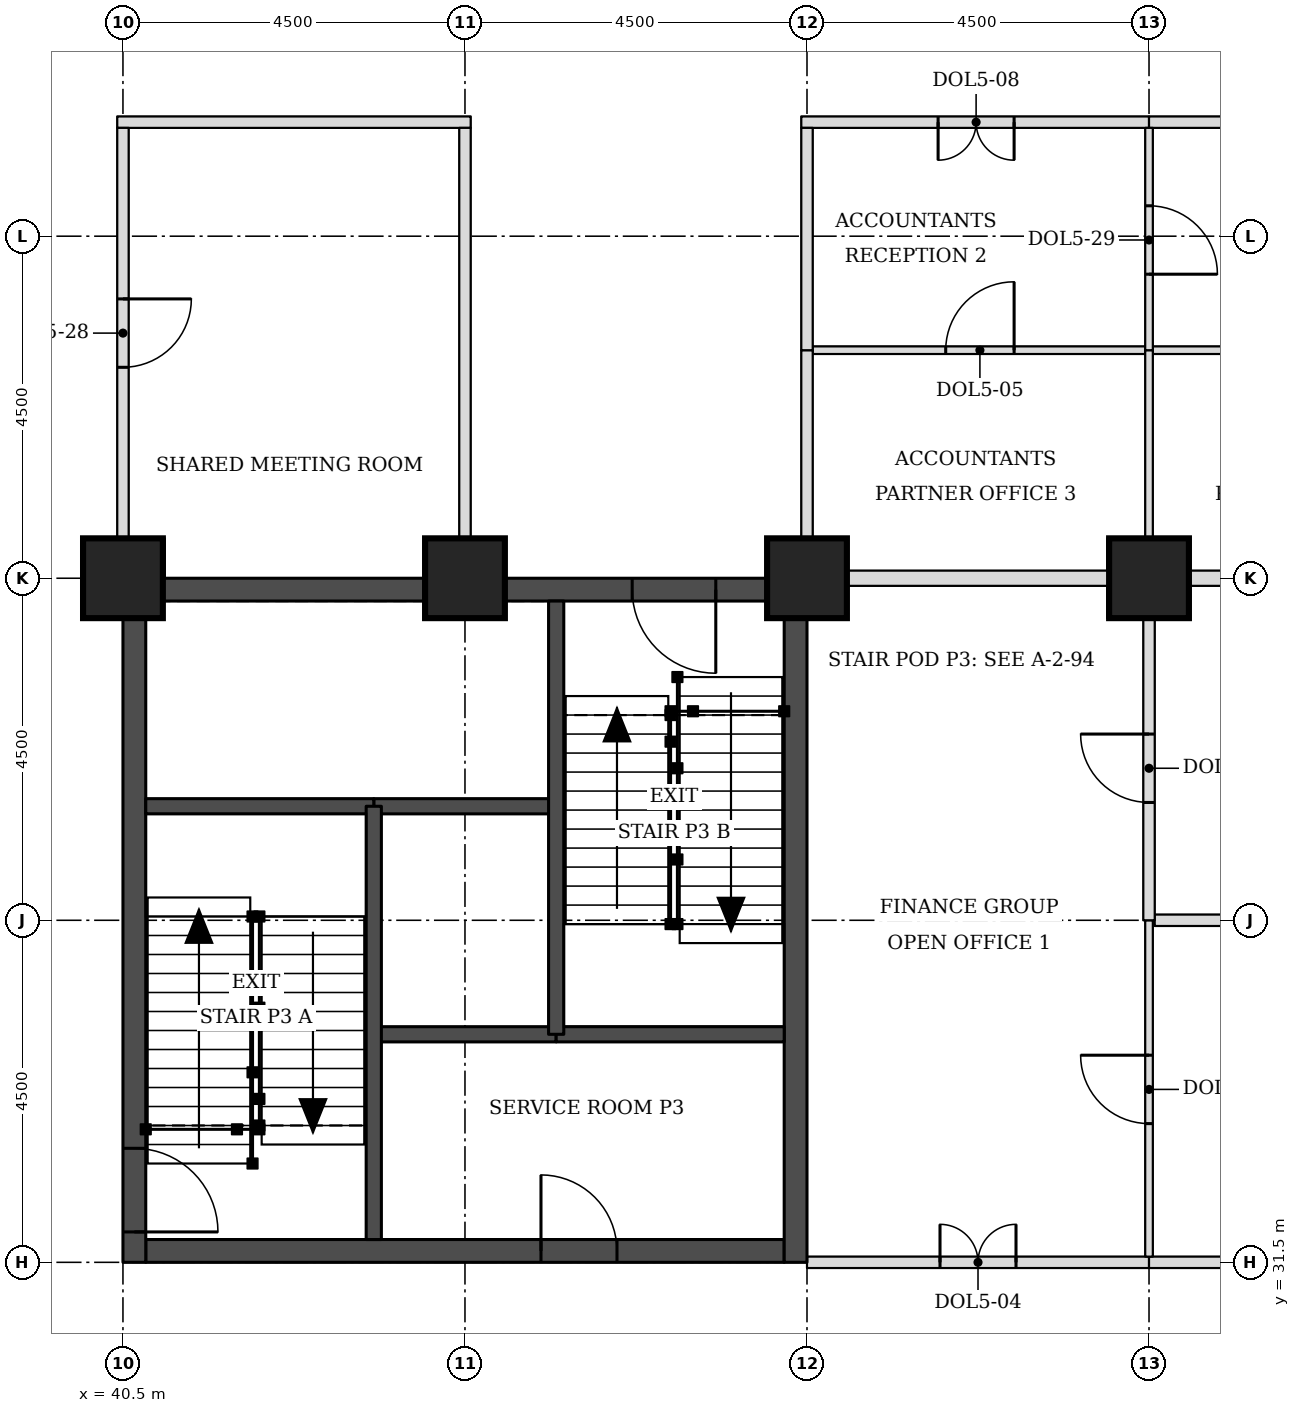
"""IFC4 building model, lengths in metres.
Left out: names, types, materials, properties, quantities, classifications, styles, units other than length and angle.
Written with IfcOpenShell. Run it as: python <this file> out.ifc"""

import sys

from ifc_helpers import new_model, si_unit, direction, frame, frame_2d, origin, origin_2d, place, context, subcontext, project, spatial, rectangle, extrude, element, fill, save


model = new_model("IFC4")
c1 = context("Model", 3, precision=1e-05, world=origin(), true_north=direction((0.0, 1.0)))
c2 = subcontext(c1, "Body", "Model", "MODEL_VIEW")
j1 = project(units=[si_unit("LENGTHUNIT", "METRE"), si_unit("PLANEANGLEUNIT", "RADIAN")], contexts=[c1])
p1 = place(None, origin())
s1 = spatial("IfcSite", under=j1, at=p1, CompositionType="ELEMENT")
p2 = place(p1, origin())
s2 = spatial("IfcBuilding", under=s1, at=p2, CompositionType="ELEMENT")
p3 = place(p2, frame((0.0, 0.0, 108.5)))
s3 = spatial("IfcBuildingStorey", under=s2, at=p3, CompositionType="ELEMENT", Elevation=108.5)
for number, where, z_axis, x_axis in (
    (1, (40.5, 40.5, 0.0), (0.0, 0.0, 1.0), (1.0, 0.0, 0.0)),
    (2, (45.0, 40.5, 0.0), (0.0, 0.0, 1.0), (1.0, 0.0, 0.0)),
    (3, (49.5, 40.5, 0.0), (0.0, 0.0, 1.0), (1.0, 0.0, 0.0)),
    (4, (54.0, 40.5, 0.0), (0.0, 0.0, 1.0), (1.0, 0.0, 0.0)),
):
    element("IfcColumn", number, at=place(p3, frame(where, z_axis=z_axis, x_axis=x_axis)), inside=s3, PredefinedType="COLUMN", context=c2, shape_type="SweptSolid", body=[
        extrude(rectangle(XDim=1.05, YDim=1.05, at=origin_2d()), origin(), (0.0, 0.0, 1.0), 3.7),
    ])
p4 = place(p3, frame((40.8, 31.65, 0.0), z_axis=(0.0, 0.0, 1.0), x_axis=(1.0, 0.0, 0.0)))
e5 = element("IfcWall", 5, at=p4, inside=s3, PredefinedType="SHEAR", context=c2, shape_type="SweptSolid", body=[
    extrude(rectangle(XDim=8.4, YDim=0.3, at=frame_2d((4.2, 0.0))), origin(), (0.0, 0.0, 1.0), 3.7),
])
p5 = place(p4, frame((5.2, 0.0, 0.0)))
e6 = element("IfcOpeningElement", 6, at=p5, cuts=e5, PredefinedType="OPENING", context=c2, shape_type="SweptSolid", body=[
    extrude(rectangle(XDim=1.0, YDim=2.1, at=frame_2d((0.5, 1.05))), frame((0.0, 0.16, 0.0), z_axis=(0.0, -1.0, 0.0), x_axis=(1.0, 0.0, 0.0)), (0.0, 0.0, 1.0), 0.32),
])
p6 = place(p3, frame((40.8, 40.35, 0.0), z_axis=(0.0, 0.0, 1.0), x_axis=(1.0, 0.0, 0.0)))
e7 = element("IfcWall", 7, at=p6, inside=s3, PredefinedType="SHEAR", context=c2, shape_type="SweptSolid", body=[
    extrude(rectangle(XDim=8.4, YDim=0.3, at=frame_2d((4.2, 0.0))), origin(), (0.0, 0.0, 1.0), 3.7),
])
p7 = place(p6, frame((6.4, 0.0, 0.0)))
e8 = element("IfcOpeningElement", 8, at=p7, cuts=e7, PredefinedType="OPENING", context=c2, shape_type="SweptSolid", body=[
    extrude(rectangle(XDim=1.1, YDim=2.1, at=frame_2d((0.55, 1.05))), frame((0.0, 0.16, 0.0), z_axis=(0.0, -1.0, 0.0), x_axis=(1.0, 0.0, 0.0)), (0.0, 0.0, 1.0), 0.32),
])
p8 = place(p3, frame((40.65, 31.5, 0.0), z_axis=(0.0, 0.0, 1.0), x_axis=(0.0, 1.0, 0.0)))
e9 = element("IfcWall", 9, at=p8, inside=s3, PredefinedType="SHEAR", context=c2, shape_type="SweptSolid", body=[
    extrude(rectangle(XDim=9.0, YDim=0.3, at=frame_2d((4.5, 0.0))), origin(), (0.0, 0.0, 1.0), 3.7),
])
p9 = place(p8, frame((0.4, 0.0, 0.0)))
e10 = element("IfcOpeningElement", 10, at=p9, cuts=e9, PredefinedType="OPENING", context=c2, shape_type="SweptSolid", body=[
    extrude(rectangle(XDim=1.1, YDim=2.1, at=frame_2d((0.55, 1.05))), frame((0.0, 0.16, 0.0), z_axis=(0.0, -1.0, 0.0), x_axis=(1.0, 0.0, 0.0)), (0.0, 0.0, 1.0), 0.32),
])
p10 = place(p3, frame((49.35, 31.5, 0.0), z_axis=(0.0, 0.0, 1.0), x_axis=(0.0, 1.0, 0.0)))
e11 = element("IfcWall", 11, at=p10, inside=s3, PredefinedType="SHEAR", context=c2, shape_type="SweptSolid", body=[
    extrude(rectangle(XDim=9.0, YDim=0.3, at=frame_2d((4.5, 0.0))), origin(), (0.0, 0.0, 1.0), 3.7),
])
p11 = place(p3, frame((49.5, 31.5, 0.0), z_axis=(0.0, 0.0, 1.0), x_axis=(1.0, 0.0, 0.0)))
e12 = element("IfcWall", 12, at=p11, inside=s3, PredefinedType="PARTITIONING", context=c2, shape_type="SweptSolid", body=[
    extrude(rectangle(XDim=4.5, YDim=0.15, at=frame_2d((2.25, 0.0))), origin(), (0.0, 0.0, 1.0), 2.55),
])
p12 = place(p11, frame((1.75, 0.0, 0.0)))
e13 = element("IfcOpeningElement", 13, at=p12, cuts=e12, PredefinedType="OPENING", context=c2, shape_type="SweptSolid", body=[
    extrude(rectangle(XDim=1.0, YDim=2.1, at=frame_2d((0.5, 1.05))), frame((0.0, 0.085, 0.0), z_axis=(0.0, -1.0, 0.0), x_axis=(1.0, 0.0, 0.0)), (0.0, 0.0, 1.0), 0.17),
])
p13 = place(p3, frame((54.0, 31.5, 0.0), z_axis=(0.0, 0.0, 1.0), x_axis=(1.0, 0.0, 0.0)))
e14 = element("IfcWall", 14, at=p13, inside=s3, PredefinedType="PARTITIONING", context=c2, shape_type="SweptSolid", body=[
    extrude(rectangle(XDim=5.025, YDim=0.15, at=frame_2d((2.512, 0.0))), origin(), (0.0, 0.0, 1.0), 2.55),
])
p14 = place(p3, frame((54.075, 36.0, 0.0), z_axis=(0.0, 0.0, 1.0), x_axis=(1.0, 0.0, 0.0)))
e15 = element("IfcWall", 15, at=p14, inside=s3, PredefinedType="PARTITIONING", context=c2, shape_type="SweptSolid", body=[
    extrude(rectangle(XDim=4.95, YDim=0.15, at=frame_2d((2.475, 0.0))), origin(), (0.0, 0.0, 1.0), 3.096),
])
p15 = place(p3, frame((50.015, 40.5, 0.0), z_axis=(0.0, 0.0, 1.0), x_axis=(1.0, 0.0, 0.0)))
e16 = element("IfcWall", 16, at=p15, inside=s3, PredefinedType="PARTITIONING", context=c2, shape_type="SweptSolid", body=[
    extrude(rectangle(XDim=3.46, YDim=0.2, at=frame_2d((1.73, 0.0))), origin(), (0.0, 0.0, 1.0), 2.8),
])
p16 = place(p3, frame((54.495, 40.5, 0.0), z_axis=(0.0, 0.0, 1.0), x_axis=(1.0, 0.0, 0.0)))
e17 = element("IfcWall", 17, at=p16, inside=s3, PredefinedType="PARTITIONING", context=c2, shape_type="SweptSolid", body=[
    extrude(rectangle(XDim=3.48, YDim=0.2, at=frame_2d((1.74, 0.0))), origin(), (0.0, 0.0, 1.0), 2.8),
])
p17 = place(p3, frame((49.575, 43.5, 0.0), z_axis=(0.0, 0.0, 1.0), x_axis=(1.0, 0.0, 0.0)))
e18 = element("IfcWall", 18, at=p17, inside=s3, PredefinedType="PARTITIONING", context=c2, shape_type="SweptSolid", body=[
    extrude(rectangle(XDim=4.375, YDim=0.1, at=frame_2d((2.188, 0.0))), origin(), (0.0, 0.0, 1.0), 3.55),
])
p18 = place(p17, frame((1.75, 0.0, 0.0)))
e19 = element("IfcOpeningElement", 19, at=p18, cuts=e18, PredefinedType="OPENING", context=c2, shape_type="SweptSolid", body=[
    extrude(rectangle(XDim=0.9, YDim=2.1, at=frame_2d((0.45, 1.05))), frame((0.0, 0.06, 0.0), z_axis=(0.0, -1.0, 0.0), x_axis=(1.0, 0.0, 0.0)), (0.0, 0.0, 1.0), 0.12),
])
p19 = place(p3, frame((54.05, 43.5, 0.0), z_axis=(0.0, 0.0, 1.0), x_axis=(1.0, 0.0, 0.0)))
e20 = element("IfcWall", 20, at=p19, inside=s3, PredefinedType="PARTITIONING", context=c2, shape_type="SweptSolid", body=[
    extrude(rectangle(XDim=4.45, YDim=0.1, at=frame_2d((2.225, 0.0))), origin(), (0.0, 0.0, 1.0), 3.55),
])
p20 = place(p19, frame((1.8, 0.0, 0.0)))
e21 = element("IfcOpeningElement", 21, at=p20, cuts=e20, PredefinedType="OPENING", context=c2, shape_type="SweptSolid", body=[
    extrude(rectangle(XDim=0.9, YDim=2.1, at=frame_2d((0.45, 1.05))), frame((0.0, 0.06, 0.0), z_axis=(0.0, -1.0, 0.0), x_axis=(1.0, 0.0, 0.0)), (0.0, 0.0, 1.0), 0.12),
])
p21 = place(p3, frame((40.425, 46.5, 0.0), z_axis=(0.0, 0.0, 1.0), x_axis=(1.0, 0.0, 0.0)))
e22 = element("IfcWall", 22, at=p21, inside=s3, PredefinedType="PARTITIONING", context=c2, shape_type="SweptSolid", body=[
    extrude(rectangle(XDim=4.65, YDim=0.15, at=frame_2d((2.325, 0.0))), origin(), (0.0, 0.0, 1.0), 3.55),
])
p22 = place(p3, frame((49.425, 46.5, 0.0), z_axis=(0.0, 0.0, 1.0), x_axis=(1.0, 0.0, 0.0)))
e23 = element("IfcWall", 23, at=p22, inside=s3, PredefinedType="PARTITIONING", context=c2, shape_type="SweptSolid", body=[
    extrude(rectangle(XDim=4.575, YDim=0.15, at=frame_2d((2.288, 0.0))), origin(), (0.0, 0.0, 1.0), 3.55),
])
p23 = place(p22, frame((1.8, 0.0, 0.0)))
e24 = element("IfcOpeningElement", 24, at=p23, cuts=e23, PredefinedType="OPENING", context=c2, shape_type="SweptSolid", body=[
    extrude(rectangle(XDim=1.0, YDim=2.1, at=frame_2d((0.5, 1.05))), frame((0.0, 0.085, 0.0), z_axis=(0.0, -1.0, 0.0), x_axis=(1.0, 0.0, 0.0)), (0.0, 0.0, 1.0), 0.17),
])
p24 = place(p3, frame((54.0, 46.5, 0.0), z_axis=(0.0, 0.0, 1.0), x_axis=(1.0, 0.0, 0.0)))
e25 = element("IfcWall", 25, at=p24, inside=s3, PredefinedType="PARTITIONING", context=c2, shape_type="SweptSolid", body=[
    extrude(rectangle(XDim=16.5, YDim=0.15, at=frame_2d((8.25, 0.0))), origin(), (0.0, 0.0, 1.0), 3.55),
])
p25 = place(p3, frame((54.0, 31.575, 0.0), z_axis=(0.0, 0.0, 1.0), x_axis=(0.0, 1.0, 0.0)))
e26 = element("IfcWall", 26, at=p25, inside=s3, PredefinedType="PARTITIONING", context=c2, shape_type="SweptSolid", body=[
    extrude(rectangle(XDim=4.425, YDim=0.1, at=frame_2d((2.212, 0.0))), origin(), (0.0, 0.0, 1.0), 3.55),
])
p26 = place(p25, frame((1.75, 0.0, 0.0)))
e27 = element("IfcOpeningElement", 27, at=p26, cuts=e26, PredefinedType="OPENING", context=c2, shape_type="SweptSolid", body=[
    extrude(rectangle(XDim=0.9, YDim=2.1, at=frame_2d((0.45, 1.05))), frame((0.0, 0.06, 0.0), z_axis=(0.0, -1.0, 0.0), x_axis=(1.0, 0.0, 0.0)), (0.0, 0.0, 1.0), 0.12),
])
p27 = place(p3, frame((54.0, 36.0, 0.0), z_axis=(0.0, 0.0, 1.0), x_axis=(0.0, 1.0, 0.0)))
e28 = element("IfcWall", 28, at=p27, inside=s3, PredefinedType="PARTITIONING", context=c2, shape_type="SweptSolid", body=[
    extrude(rectangle(XDim=3.975, YDim=0.15, at=frame_2d((1.988, 0.0))), origin(), (0.0, 0.0, 1.0), 3.55),
])
p28 = place(p27, frame((1.55, 0.0, 0.0)))
e29 = element("IfcOpeningElement", 29, at=p28, cuts=e28, PredefinedType="OPENING", context=c2, shape_type="SweptSolid", body=[
    extrude(rectangle(XDim=0.9, YDim=2.1, at=frame_2d((0.45, 1.05))), frame((0.0, 0.085, 0.0), z_axis=(0.0, -1.0, 0.0), x_axis=(1.0, 0.0, 0.0)), (0.0, 0.0, 1.0), 0.17),
])
p29 = place(p3, frame((40.5, 41.025, 0.0), z_axis=(0.0, 0.0, 1.0), x_axis=(0.0, 1.0, 0.0)))
e30 = element("IfcWall", 30, at=p29, inside=s3, PredefinedType="PARTITIONING", context=c2, shape_type="SweptSolid", body=[
    extrude(rectangle(XDim=5.4, YDim=0.15, at=frame_2d((2.7, 0.0))), origin(), (0.0, 0.0, 1.0), 3.55),
])
p30 = place(p29, frame((2.25, 0.0, 0.0)))
e31 = element("IfcOpeningElement", 31, at=p30, cuts=e30, PredefinedType="OPENING", context=c2, shape_type="SweptSolid", body=[
    extrude(rectangle(XDim=0.9, YDim=2.1, at=frame_2d((0.45, 1.05))), frame((0.0, 0.085, 0.0), z_axis=(0.0, -1.0, 0.0), x_axis=(1.0, 0.0, 0.0)), (0.0, 0.0, 1.0), 0.17),
])
p31 = place(p3, frame((45.0, 41.025, 0.0), z_axis=(0.0, 0.0, 1.0), x_axis=(0.0, 1.0, 0.0)))
e32 = element("IfcWall", 32, at=p31, inside=s3, PredefinedType="PARTITIONING", context=c2, shape_type="SweptSolid", body=[
    extrude(rectangle(XDim=5.4, YDim=0.15, at=frame_2d((2.7, 0.0))), origin(), (0.0, 0.0, 1.0), 3.55),
])
p32 = place(p3, frame((49.5, 41.025, 0.0), z_axis=(0.0, 0.0, 1.0), x_axis=(0.0, 1.0, 0.0)))
e33 = element("IfcWall", 33, at=p32, inside=s3, PredefinedType="PARTITIONING", context=c2, shape_type="SweptSolid", body=[
    extrude(rectangle(XDim=2.475, YDim=0.15, at=frame_2d((1.238, 0.0))), origin(), (0.0, 0.0, 1.0), 3.55),
])
p33 = place(p3, frame((54.0, 41.025, 0.0), z_axis=(0.0, 0.0, 1.0), x_axis=(0.0, 1.0, 0.0)))
e34 = element("IfcWall", 34, at=p33, inside=s3, PredefinedType="PARTITIONING", context=c2, shape_type="SweptSolid", body=[
    extrude(rectangle(XDim=2.475, YDim=0.1, at=frame_2d((1.238, 0.0))), origin(), (0.0, 0.0, 1.0), 3.55),
])
p34 = place(p3, frame((49.5, 43.5, 0.0), z_axis=(0.0, 0.0, 1.0), x_axis=(0.0, 1.0, 0.0)))
e35 = element("IfcWall", 35, at=p34, inside=s3, PredefinedType="PARTITIONING", context=c2, shape_type="SweptSolid", body=[
    extrude(rectangle(XDim=2.925, YDim=0.15, at=frame_2d((1.462, 0.0))), origin(), (0.0, 0.0, 1.0), 3.55),
])
p35 = place(p3, frame((54.0, 43.5, 0.0), z_axis=(0.0, 0.0, 1.0), x_axis=(0.0, 1.0, 0.0)))
e36 = element("IfcWall", 36, at=p35, inside=s3, PredefinedType="PARTITIONING", context=c2, shape_type="SweptSolid", body=[
    extrude(rectangle(XDim=2.925, YDim=0.1, at=frame_2d((1.462, 0.0))), origin(), (0.0, 0.0, 1.0), 3.55),
])
p36 = place(p35, frame((1.0, 0.0, 0.0)))
e37 = element("IfcOpeningElement", 37, at=p36, cuts=e36, PredefinedType="OPENING", context=c2, shape_type="SweptSolid", body=[
    extrude(rectangle(XDim=0.9, YDim=2.1, at=frame_2d((0.45, 1.05))), frame((0.0, 0.06, 0.0), z_axis=(0.0, -1.0, 0.0), x_axis=(1.0, 0.0, 0.0)), (0.0, 0.0, 1.0), 0.12),
])
p37 = place(p3, frame((43.8, 34.5, 0.0), z_axis=(0.0, 0.0, 1.0), x_axis=(1.0, 0.0, 0.0)))
e38 = element("IfcWall", 38, at=p37, inside=s3, PredefinedType="SOLIDWALL", context=c2, shape_type="SweptSolid", body=[
    extrude(rectangle(XDim=2.4, YDim=0.2, at=frame_2d((1.2, 0.0))), origin(), (0.0, 0.0, 1.0), 3.55),
])
p38 = place(p3, frame((46.2, 34.5, 0.0), z_axis=(0.0, 0.0, 1.0), x_axis=(1.0, 0.0, 0.0)))
e39 = element("IfcWall", 39, at=p38, inside=s3, PredefinedType="SOLIDWALL", context=c2, shape_type="SweptSolid", body=[
    extrude(rectangle(XDim=3.0, YDim=0.2, at=frame_2d((1.5, 0.0))), origin(), (0.0, 0.0, 1.0), 3.55),
])
p39 = place(p3, frame((43.8, 37.5, 0.0), z_axis=(0.0, 0.0, 1.0), x_axis=(1.0, 0.0, 0.0)))
e40 = element("IfcWall", 40, at=p39, inside=s3, PredefinedType="SOLIDWALL", context=c2, shape_type="SweptSolid", body=[
    extrude(rectangle(XDim=2.4, YDim=0.2, at=frame_2d((1.2, 0.0))), origin(), (0.0, 0.0, 1.0), 3.7),
])
p40 = place(p3, frame((40.8, 37.5, 0.0), z_axis=(0.0, 0.0, 1.0), x_axis=(1.0, 0.0, 0.0)))
e41 = element("IfcWall", 41, at=p40, inside=s3, PredefinedType="SOLIDWALL", context=c2, shape_type="SweptSolid", body=[
    extrude(rectangle(XDim=3.0, YDim=0.2, at=frame_2d((1.5, 0.0))), origin(), (0.0, 0.0, 1.0), 3.55),
])
for number, where, z_axis, x_axis in (
    (42, (43.8, 31.8, 0.0), (0.0, 0.0, 1.0), (0.0, 1.0, 0.0)),
    (43, (46.2, 34.5, 0.0), (0.0, 0.0, 1.0), (0.0, 1.0, 0.0)),
):
    element("IfcWall", number, at=place(p3, frame(where, z_axis=z_axis, x_axis=x_axis)), inside=s3, PredefinedType="SOLIDWALL", context=c2, shape_type="SweptSolid", body=[
        extrude(rectangle(XDim=5.7, YDim=0.2, at=frame_2d((2.85, 0.0))), origin(), (0.0, 0.0, 1.0), 3.55),
    ])
p41 = place(p30, frame((0.9, 0.0, 0.0), z_axis=(0.0, 0.0, 1.0), x_axis=(-1.0, 0.0, 0.0)))
e44 = element("IfcDoor", 44, at=p41, inside=s3, OperationType="SINGLE_SWING_LEFT", PredefinedType="DOOR", context=c2, shape_type="SweptSolid", body=[
    extrude(rectangle(XDim=0.9, YDim=2.1, at=frame_2d((0.45, 1.05))), frame((0.0, 0.025, 0.0), z_axis=(0.0, -1.0, 0.0), x_axis=(1.0, 0.0, 0.0)), (0.0, 0.0, 1.0), 0.05),
])
fill(e31, e44)
p42 = place(p12, origin())
e45 = element("IfcDoor", 45, at=p42, inside=s3, OperationType="DOUBLE_DOOR_SINGLE_SWING", PredefinedType="DOOR", context=c2, shape_type="SweptSolid", body=[
    extrude(rectangle(XDim=1.0, YDim=2.1, at=frame_2d((0.5, 1.05))), frame((0.0, 0.025, 0.0), z_axis=(0.0, -1.0, 0.0), x_axis=(1.0, 0.0, 0.0)), (0.0, 0.0, 1.0), 0.05),
])
fill(e13, e45)
p43 = place(p26, origin())
e46 = element("IfcDoor", 46, at=p43, inside=s3, OperationType="SINGLE_SWING_RIGHT", PredefinedType="DOOR", context=c2, shape_type="SweptSolid", body=[
    extrude(rectangle(XDim=0.9, YDim=2.1, at=frame_2d((0.45, 1.05))), frame((0.0, 0.025, 0.0), z_axis=(0.0, -1.0, 0.0), x_axis=(1.0, 0.0, 0.0)), (0.0, 0.0, 1.0), 0.05),
])
fill(e27, e46)
p44 = place(p28, origin())
e47 = element("IfcDoor", 47, at=p44, inside=s3, OperationType="SINGLE_SWING_RIGHT", PredefinedType="DOOR", context=c2, shape_type="SweptSolid", body=[
    extrude(rectangle(XDim=0.9, YDim=2.1, at=frame_2d((0.45, 1.05))), frame((0.0, 0.025, 0.0), z_axis=(0.0, -1.0, 0.0), x_axis=(1.0, 0.0, 0.0)), (0.0, 0.0, 1.0), 0.05),
])
fill(e29, e47)
p45 = place(p23, frame((1.0, 0.0, 0.0), z_axis=(0.0, 0.0, 1.0), x_axis=(-1.0, 0.0, 0.0)))
e48 = element("IfcDoor", 48, at=p45, inside=s3, OperationType="DOUBLE_DOOR_SINGLE_SWING", PredefinedType="DOOR", context=c2, shape_type="SweptSolid", body=[
    extrude(rectangle(XDim=1.0, YDim=2.1, at=frame_2d((0.5, 1.05))), frame((0.0, 0.025, 0.0), z_axis=(0.0, -1.0, 0.0), x_axis=(1.0, 0.0, 0.0)), (0.0, 0.0, 1.0), 0.05),
])
fill(e24, e48)
p46 = place(p36, frame((0.9, 0.0, 0.0), z_axis=(0.0, 0.0, 1.0), x_axis=(-1.0, 0.0, 0.0)))
e49 = element("IfcDoor", 49, at=p46, inside=s3, OperationType="SINGLE_SWING_RIGHT", PredefinedType="DOOR", context=c2, shape_type="SweptSolid", body=[
    extrude(rectangle(XDim=0.9, YDim=2.1, at=frame_2d((0.45, 1.05))), frame((0.0, 0.025, 0.0), z_axis=(0.0, -1.0, 0.0), x_axis=(1.0, 0.0, 0.0)), (0.0, 0.0, 1.0), 0.05),
])
fill(e37, e49)
p47 = place(p18, origin())
e50 = element("IfcDoor", 50, at=p47, inside=s3, OperationType="SINGLE_SWING_RIGHT", PredefinedType="DOOR", context=c2, shape_type="SweptSolid", body=[
    extrude(rectangle(XDim=0.9, YDim=2.1, at=frame_2d((0.45, 1.05))), frame((0.0, 0.025, 0.0), z_axis=(0.0, -1.0, 0.0), x_axis=(1.0, 0.0, 0.0)), (0.0, 0.0, 1.0), 0.05),
])
fill(e19, e50)
p48 = place(p9, frame((1.1, 0.0, 0.0), z_axis=(0.0, 0.0, 1.0), x_axis=(-1.0, 0.0, 0.0)))
e51 = element("IfcDoor", 51, at=p48, inside=s3, OperationType="SINGLE_SWING_RIGHT", PredefinedType="DOOR", context=c2, shape_type="SweptSolid", body=[
    extrude(rectangle(XDim=1.1, YDim=2.1, at=frame_2d((0.55, 1.05))), frame((0.0, 0.025, 0.0), z_axis=(0.0, -1.0, 0.0), x_axis=(1.0, 0.0, 0.0)), (0.0, 0.0, 1.0), 0.05),
])
fill(e10, e51)
p49 = place(p7, frame((1.1, 0.0, 0.0), z_axis=(0.0, 0.0, 1.0), x_axis=(-1.0, 0.0, 0.0)))
e52 = element("IfcDoor", 52, at=p49, inside=s3, OperationType="SINGLE_SWING_LEFT", PredefinedType="DOOR", context=c2, shape_type="SweptSolid", body=[
    extrude(rectangle(XDim=1.1, YDim=2.1, at=frame_2d((0.55, 1.05))), frame((0.0, 0.025, 0.0), z_axis=(0.0, -1.0, 0.0), x_axis=(1.0, 0.0, 0.0)), (0.0, 0.0, 1.0), 0.05),
])
fill(e8, e52)
p50 = place(p5, origin())
e53 = element("IfcDoor", 53, at=p50, inside=s3, OperationType="SINGLE_SWING_LEFT", PredefinedType="DOOR", context=c2, shape_type="SweptSolid", body=[
    extrude(rectangle(XDim=1.0, YDim=2.1, at=frame_2d((0.5, 1.05))), frame((0.0, 0.025, 0.0), z_axis=(0.0, -1.0, 0.0), x_axis=(1.0, 0.0, 0.0)), (0.0, 0.0, 1.0), 0.05),
])
fill(e6, e53)
save(model, sys.argv[1])
